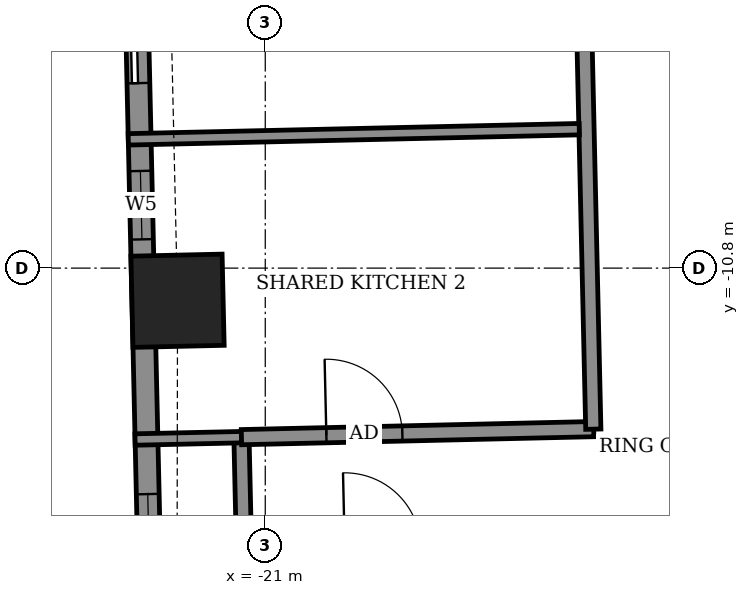
"""IFC4 building model, lengths in metres.
Left out: names, types, materials, properties, quantities, classifications, styles, units other than length and angle.
Written with IfcOpenShell. Run it as: python <this file> out.ifc"""

import sys

from ifc_helpers import new_model, si_unit, direction, frame, frame_2d, origin, origin_2d, place, context, subcontext, project, spatial, rectangle, extrude, element, fill, save


model = new_model("IFC4")
c1 = context("Model", 3, precision=1e-05, world=origin(), true_north=direction((0.0, 1.0)))
c2 = subcontext(c1, "Body", "Model", "MODEL_VIEW")
j1 = project(units=[si_unit("LENGTHUNIT", "METRE"), si_unit("PLANEANGLEUNIT", "RADIAN")], contexts=[c1])
p1 = place(None, origin())
s1 = spatial("IfcSite", under=j1, at=p1, CompositionType="ELEMENT")
p2 = place(p1, origin())
s2 = spatial("IfcBuilding", under=s1, at=p2, CompositionType="ELEMENT")
p3 = place(p2, frame((0.0, 0.0, 182.5)))
s3 = spatial("IfcBuildingStorey", under=s2, at=p3, CompositionType="ELEMENT", Elevation=182.5)
p4 = place(p3, frame((-22.154, -11.229, -0.55), z_axis=(0.0, 0.0, 1.0), x_axis=(0.022702688514, -0.999742260752, 0.0)))
e1 = element("IfcColumn", 1, at=p4, inside=s3, PredefinedType="COLUMN", context=c2, shape_type="SweptSolid", body=[
    extrude(rectangle(XDim=1.2, YDim=1.2, at=origin_2d()), origin(), (0.0, 0.0, 1.0), 3.6),
])
p5 = place(p3, frame((-22.729, -5.725, 0.0), z_axis=(0.0, 0.0, 1.0), x_axis=(0.022726014582, -0.999741730779, 0.0)))
e2 = element("IfcWall", 2, at=p5, inside=s3, PredefinedType="SOLIDWALL", context=c2, shape_type="SweptSolid", body=[
    extrude(rectangle(XDim=10.829, YDim=0.3, at=frame_2d((5.414, 0.0))), origin(), (0.0, 0.0, 1.0), 3.05),
])
p6 = place(p5, frame((1.142, 0.0, 0.0)))
e3 = element("IfcOpeningElement", 3, at=p6, cuts=e2, PredefinedType="OPENING", context=c2, shape_type="SweptSolid", body=[
    extrude(rectangle(XDim=1.5, YDim=2.4, at=frame_2d((0.75, 1.2))), frame((0.0, 0.16, 0.0), z_axis=(0.0, -1.0, 0.0), x_axis=(1.0, 0.0, 0.0)), (0.0, 0.0, 1.0), 0.32),
])
p7 = place(p5, frame((3.798, 0.0, 0.9)))
e4 = element("IfcOpeningElement", 4, at=p7, cuts=e2, PredefinedType="OPENING", context=c2, shape_type="SweptSolid", body=[
    extrude(rectangle(XDim=0.9, YDim=1.5, at=frame_2d((0.45, 0.75))), frame((0.0, 0.16, 0.0), z_axis=(0.0, -1.0, 0.0), x_axis=(1.0, 0.0, 0.0)), (0.0, 0.0, 1.0), 0.32),
])
p8 = place(p5, frame((8.05, 0.0, 0.9)))
e5 = element("IfcOpeningElement", 5, at=p8, cuts=e2, PredefinedType="OPENING", context=c2, shape_type="SweptSolid", body=[
    extrude(rectangle(XDim=1.2, YDim=1.5, at=frame_2d((0.6, 0.75))), frame((0.0, 0.16, 0.0), z_axis=(0.0, -1.0, 0.0), x_axis=(1.0, 0.0, 0.0)), (0.0, 0.0, 1.0), 0.32),
])
p9 = place(p3, frame((-21.279, -14.523, 0.0), z_axis=(0.0, 0.0, 1.0), x_axis=(0.999742878501, 0.022675468818, 0.0)))
e6 = element("IfcWall", 6, at=p9, inside=s3, PredefinedType="PARTITIONING", context=c2, shape_type="SweptSolid", body=[
    extrude(rectangle(XDim=46.48, YDim=0.2, at=frame_2d((23.24, 0.0))), origin(), (0.0, 0.0, 1.0), 3.05),
])
p10 = place(p9, frame((1.325, 0.0, 0.0)))
e7 = element("IfcOpeningElement", 7, at=p10, cuts=e6, PredefinedType="OPENING", context=c2, shape_type="SweptSolid", body=[
    extrude(rectangle(XDim=1.0, YDim=2.1, at=frame_2d((0.5, 1.05))), frame((0.0, 0.11, 0.0), z_axis=(0.0, -1.0, 0.0), x_axis=(1.0, 0.0, 0.0)), (0.0, 0.0, 1.0), 0.22),
])
p11 = place(p9, frame((5.9, 0.0, 0.0)))
e8 = element("IfcOpeningElement", 8, at=p11, cuts=e6, PredefinedType="OPENING", context=c2, shape_type="SweptSolid", body=[
    extrude(rectangle(XDim=0.9, YDim=2.1, at=frame_2d((0.45, 1.05))), frame((0.0, 0.11, 0.0), z_axis=(0.0, -1.0, 0.0), x_axis=(1.0, 0.0, 0.0)), (0.0, 0.0, 1.0), 0.22),
])
p12 = place(p9, frame((10.6, 0.0, 0.0)))
e9 = element("IfcOpeningElement", 9, at=p12, cuts=e6, PredefinedType="OPENING", context=c2, shape_type="SweptSolid", body=[
    extrude(rectangle(XDim=0.9, YDim=2.1, at=frame_2d((0.45, 1.05))), frame((0.0, 0.11, 0.0), z_axis=(0.0, -1.0, 0.0), x_axis=(1.0, 0.0, 0.0)), (0.0, 0.0, 1.0), 0.22),
])
p13 = place(p9, frame((12.525, 0.0, 0.0)))
e10 = element("IfcOpeningElement", 10, at=p13, cuts=e6, PredefinedType="OPENING", context=c2, shape_type="SweptSolid", body=[
    extrude(rectangle(XDim=0.9, YDim=2.1, at=frame_2d((0.45, 1.05))), frame((0.0, 0.11, 0.0), z_axis=(0.0, -1.0, 0.0), x_axis=(1.0, 0.0, 0.0)), (0.0, 0.0, 1.0), 0.22),
])
p14 = place(p9, frame((19.175, 0.0, 0.0)))
e11 = element("IfcOpeningElement", 11, at=p14, cuts=e6, PredefinedType="OPENING", context=c2, shape_type="SweptSolid", body=[
    extrude(rectangle(XDim=0.9, YDim=2.1, at=frame_2d((0.45, 1.05))), frame((0.0, 0.11, 0.0), z_axis=(0.0, -1.0, 0.0), x_axis=(1.0, 0.0, 0.0)), (0.0, 0.0, 1.0), 0.22),
])
p15 = place(p9, frame((21.05, 0.0, 0.0)))
e12 = element("IfcOpeningElement", 12, at=p15, cuts=e6, PredefinedType="OPENING", context=c2, shape_type="SweptSolid", body=[
    extrude(rectangle(XDim=0.9, YDim=2.1, at=frame_2d((0.45, 1.05))), frame((0.0, 0.11, 0.0), z_axis=(0.0, -1.0, 0.0), x_axis=(1.0, 0.0, 0.0)), (0.0, 0.0, 1.0), 0.22),
])
p16 = place(p9, frame((27.725, 0.0, 0.0)))
e13 = element("IfcOpeningElement", 13, at=p16, cuts=e6, PredefinedType="OPENING", context=c2, shape_type="SweptSolid", body=[
    extrude(rectangle(XDim=0.9, YDim=2.1, at=frame_2d((0.45, 1.05))), frame((0.0, 0.11, 0.0), z_axis=(0.0, -1.0, 0.0), x_axis=(1.0, 0.0, 0.0)), (0.0, 0.0, 1.0), 0.22),
])
p17 = place(p9, frame((29.6, 0.0, 0.0)))
e14 = element("IfcOpeningElement", 14, at=p17, cuts=e6, PredefinedType="OPENING", context=c2, shape_type="SweptSolid", body=[
    extrude(rectangle(XDim=0.9, YDim=2.1, at=frame_2d((0.45, 1.05))), frame((0.0, 0.11, 0.0), z_axis=(0.0, -1.0, 0.0), x_axis=(1.0, 0.0, 0.0)), (0.0, 0.0, 1.0), 0.22),
])
p18 = place(p9, frame((36.325, 0.0, 0.0)))
e15 = element("IfcOpeningElement", 15, at=p18, cuts=e6, PredefinedType="OPENING", context=c2, shape_type="SweptSolid", body=[
    extrude(rectangle(XDim=0.9, YDim=2.1, at=frame_2d((0.45, 1.05))), frame((0.0, 0.11, 0.0), z_axis=(0.0, -1.0, 0.0), x_axis=(1.0, 0.0, 0.0)), (0.0, 0.0, 1.0), 0.22),
])
p19 = place(p9, frame((43.915, 0.0, 0.0)))
e16 = element("IfcOpeningElement", 16, at=p19, cuts=e6, PredefinedType="OPENING", context=c2, shape_type="SweptSolid", body=[
    extrude(rectangle(XDim=1.0, YDim=2.1, at=frame_2d((0.5, 1.05))), frame((0.0, 0.11, 0.0), z_axis=(0.0, -1.0, 0.0), x_axis=(1.0, 0.0, 0.0)), (0.0, 0.0, 1.0), 0.22),
])
p20 = place(p9, frame((38.6, 0.0, 0.0)))
e17 = element("IfcOpeningElement", 17, at=p20, cuts=e6, PredefinedType="OPENING", context=c2, shape_type="SweptSolid", body=[
    extrude(rectangle(XDim=0.9, YDim=2.1, at=frame_2d((0.45, 1.05))), frame((0.0, 0.11, 0.0), z_axis=(0.0, -1.0, 0.0), x_axis=(1.0, 0.0, 0.0)), (0.0, 0.0, 1.0), 0.22),
])
p21 = place(p3, frame((-21.279, -14.523, 0.0), z_axis=(0.0, 0.0, 1.0), x_axis=(-0.022632637625, 0.99974384905, 0.0)))
e18 = element("IfcWall", 18, at=p21, inside=s3, PredefinedType="PARTITIONING", context=c2, shape_type="SweptSolid", body=[
    extrude(rectangle(XDim=1.5, YDim=0.2, at=frame_2d((0.75, 0.0))), origin(), (0.0, 0.0, 1.0), 3.05),
])
p22 = place(p3, frame((-22.713, -13.055, 0.0), z_axis=(0.0, 0.0, 1.0), x_axis=(0.999756172383, 0.022081571112, 0.0)))
e19 = element("IfcWall", 19, at=p22, inside=s3, PredefinedType="PARTITIONING", context=c2, shape_type="SweptSolid", body=[
    extrude(rectangle(XDim=1.404, YDim=0.15, at=frame_2d((0.702, 0.0))), origin(), (0.0, 0.0, 1.0), 2.55),
])
p23 = place(p3, frame((-21.313, -13.024, 0.0), z_axis=(0.0, 0.0, 1.0), x_axis=(0.999738699021, 0.022858995594, 0.0)))
e20 = element("IfcWall", 20, at=p23, inside=s3, PredefinedType="PARTITIONING", context=c2, shape_type="SweptSolid", body=[
    extrude(rectangle(XDim=4.635, YDim=0.2, at=frame_2d((2.318, 0.0))), origin(), (0.0, 0.0, 1.0), 3.05),
])
p24 = place(p23, frame((1.117, 0.0, 0.0)))
e21 = element("IfcOpeningElement", 21, at=p24, cuts=e20, PredefinedType="OPENING", context=c2, shape_type="SweptSolid", body=[
    extrude(rectangle(XDim=1.0, YDim=2.1, at=frame_2d((0.5, 1.05))), frame((0.0, 0.11, 0.0), z_axis=(0.0, -1.0, 0.0), x_axis=(1.0, 0.0, 0.0)), (0.0, 0.0, 1.0), 0.22),
])
p25 = place(p3, frame((-16.684, -12.919, 0.0), z_axis=(0.0, 0.0, 1.0), x_axis=(-0.022694293906, 0.999742451346, 0.0)))
e22 = element("IfcWall", 22, at=p25, inside=s3, PredefinedType="PARTITIONING", context=c2, shape_type="SweptSolid", body=[
    extrude(rectangle(XDim=28.024, YDim=0.2, at=frame_2d((14.012, 0.0))), origin(), (0.0, 0.0, 1.0), 3.05),
])
p26 = place(p25, frame((22.625, 0.0, 0.0)))
e23 = element("IfcOpeningElement", 23, at=p26, cuts=e22, PredefinedType="OPENING", context=c2, shape_type="SweptSolid", body=[
    extrude(rectangle(XDim=1.0, YDim=2.1, at=frame_2d((0.5, 1.05))), frame((0.0, 0.11, 0.0), z_axis=(0.0, -1.0, 0.0), x_axis=(1.0, 0.0, 0.0)), (0.0, 0.0, 1.0), 0.22),
])
p27 = place(p25, frame((26.174, 0.0, 0.0)))
e24 = element("IfcOpeningElement", 24, at=p27, cuts=e22, PredefinedType="OPENING", context=c2, shape_type="SweptSolid", body=[
    extrude(rectangle(XDim=0.9, YDim=2.1, at=frame_2d((0.45, 1.05))), frame((0.0, 0.11, 0.0), z_axis=(0.0, -1.0, 0.0), x_axis=(1.0, 0.0, 0.0)), (0.0, 0.0, 1.0), 0.22),
])
p28 = place(p25, frame((16.432, 0.0, 0.0)))
e25 = element("IfcOpeningElement", 25, at=p28, cuts=e22, PredefinedType="OPENING", context=c2, shape_type="SweptSolid", body=[
    extrude(rectangle(XDim=1.0, YDim=2.1, at=frame_2d((0.5, 1.05))), frame((0.0, 0.11, 0.0), z_axis=(0.0, -1.0, 0.0), x_axis=(1.0, 0.0, 0.0)), (0.0, 0.0, 1.0), 0.22),
])
p29 = place(p25, frame((10.975, 0.0, 0.0)))
e26 = element("IfcOpeningElement", 26, at=p29, cuts=e22, PredefinedType="OPENING", context=c2, shape_type="SweptSolid", body=[
    extrude(rectangle(XDim=1.0, YDim=2.1, at=frame_2d((0.5, 1.05))), frame((0.0, 0.11, 0.0), z_axis=(0.0, -1.0, 0.0), x_axis=(1.0, 0.0, 0.0)), (0.0, 0.0, 1.0), 0.22),
])
p30 = place(p25, frame((8.025, 0.0, 0.0)))
e27 = element("IfcOpeningElement", 27, at=p30, cuts=e22, PredefinedType="OPENING", context=c2, shape_type="SweptSolid", body=[
    extrude(rectangle(XDim=0.9, YDim=2.1, at=frame_2d((0.45, 1.05))), frame((0.0, 0.11, 0.0), z_axis=(0.0, -1.0, 0.0), x_axis=(1.0, 0.0, 0.0)), (0.0, 0.0, 1.0), 0.22),
])
p31 = place(p25, frame((5.113, 0.0, 0.0)))
e28 = element("IfcOpeningElement", 28, at=p31, cuts=e22, PredefinedType="OPENING", context=c2, shape_type="SweptSolid", body=[
    extrude(rectangle(XDim=1.0, YDim=2.1, at=frame_2d((0.5, 1.05))), frame((0.0, 0.11, 0.0), z_axis=(0.0, -1.0, 0.0), x_axis=(1.0, 0.0, 0.0)), (0.0, 0.0, 1.0), 0.22),
])
p32 = place(p3, frame((-22.802, -9.106, 0.0), z_axis=(0.0, 0.0, 1.0), x_axis=(0.999744927012, 0.022584970987, 0.0)))
e29 = element("IfcWall", 29, at=p32, inside=s3, PredefinedType="PARTITIONING", context=c2, shape_type="SweptSolid", body=[
    extrude(rectangle(XDim=5.935, YDim=0.15, at=frame_2d((2.967, 0.0))), origin(), (0.0, 0.0, 1.0), 2.55),
])
p33 = place(p6, origin())
e30 = element("IfcDoor", 30, at=p33, inside=s3, OperationType="SLIDING_TO_LEFT", PredefinedType="DOOR", context=c2, shape_type="SweptSolid", body=[
    extrude(rectangle(XDim=1.5, YDim=2.4, at=frame_2d((0.75, 1.2))), frame((0.0, 0.025, 0.0), z_axis=(0.0, -1.0, 0.0), x_axis=(1.0, 0.0, 0.0)), (0.0, 0.0, 1.0), 0.05),
])
fill(e3, e30)
p34 = place(p7, origin())
e31 = element("IfcWindow", 31, at=p34, inside=s3, PartitioningType="SINGLE_PANEL", PredefinedType="WINDOW", context=c2, shape_type="SweptSolid", body=[
    extrude(rectangle(XDim=0.9, YDim=1.5, at=frame_2d((0.45, 0.75))), frame((0.0, 0.03, 0.0), z_axis=(0.0, -1.0, 0.0), x_axis=(1.0, 0.0, 0.0)), (0.0, 0.0, 1.0), 0.06),
])
fill(e4, e31)
p35 = place(p8, origin())
e32 = element("IfcWindow", 32, at=p35, inside=s3, PartitioningType="SINGLE_PANEL", PredefinedType="WINDOW", context=c2, shape_type="SweptSolid", body=[
    extrude(rectangle(XDim=1.2, YDim=1.5, at=frame_2d((0.6, 0.75))), frame((0.0, 0.03, 0.0), z_axis=(0.0, -1.0, 0.0), x_axis=(1.0, 0.0, 0.0)), (0.0, 0.0, 1.0), 0.06),
])
fill(e5, e32)
p36 = place(p24, origin())
e33 = element("IfcDoor", 33, at=p36, inside=s3, OperationType="SINGLE_SWING_LEFT", PredefinedType="DOOR", context=c2, shape_type="SweptSolid", body=[
    extrude(rectangle(XDim=1.0, YDim=2.1, at=frame_2d((0.5, 1.05))), frame((0.0, 0.025, 0.0), z_axis=(0.0, -1.0, 0.0), x_axis=(1.0, 0.0, 0.0)), (0.0, 0.0, 1.0), 0.05),
])
fill(e21, e33)
save(model, sys.argv[1])
